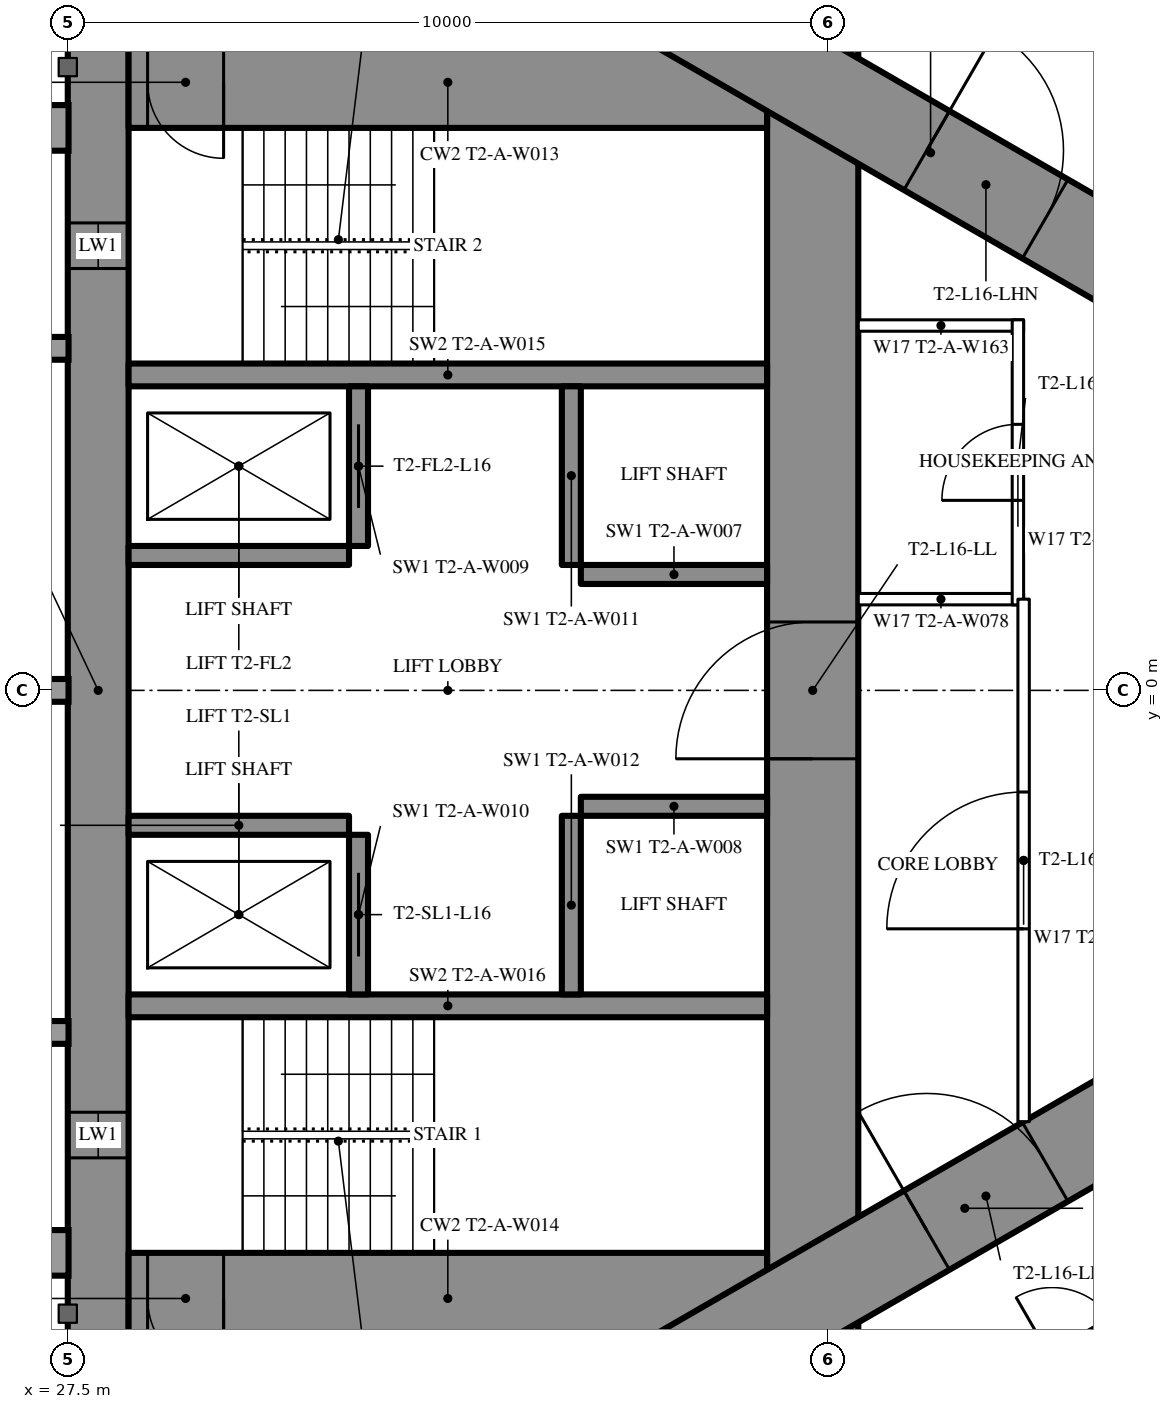
"""IFC4 building model, lengths in metres.
Left out: names, types, materials, properties, quantities, classifications, styles, units other than length and angle.
Written with IfcOpenShell. Run it as: python <this file> out.ifc"""

import sys

from ifc_helpers import new_model, si_unit, direction, frame, frame_2d, origin, place, context, subcontext, project, spatial, rectangle, extrude, element, fill, save


model = new_model("IFC4")
c1 = context("Model", 3, precision=1e-05, world=origin(), true_north=direction((0.0, 1.0)))
c2 = subcontext(c1, "Body", "Model", "MODEL_VIEW")
j1 = project(units=[si_unit("LENGTHUNIT", "METRE"), si_unit("PLANEANGLEUNIT", "RADIAN")], contexts=[c1])
p1 = place(None, origin())
s1 = spatial("IfcSite", under=j1, at=p1, CompositionType="ELEMENT")
p2 = place(p1, origin())
s2 = spatial("IfcBuilding", under=s1, at=p2, CompositionType="ELEMENT")
p3 = place(p2, frame((0.0, 0.0, 63.5)))
s3 = spatial("IfcBuildingStorey", under=s2, at=p3, CompositionType="ELEMENT", Elevation=63.5)
p4 = place(p3, frame((27.9, -8.6, 0.0), z_axis=(0.0, 0.0, 1.0), x_axis=(0.0, 1.0, 0.0)))
e1 = element("IfcWall", 1, at=p4, inside=s3, PredefinedType="SHEAR", context=c2, shape_type="SweptSolid", body=[
    extrude(rectangle(XDim=17.2, YDim=0.8, at=frame_2d((8.6, 0.0))), origin(), (0.0, 0.0, 1.0), 3.5),
])
p5 = place(p4, frame((2.45, 0.0, 0.6)))
e2 = element("IfcOpeningElement", 2, at=p5, cuts=e1, PredefinedType="OPENING", context=c2, shape_type="SweptSolid", body=[
    extrude(rectangle(XDim=0.6, YDim=2.1, at=frame_2d((0.3, 1.05))), frame((0.0, 0.41, 0.0), z_axis=(0.0, -1.0, 0.0), x_axis=(1.0, 0.0, 0.0)), (0.0, 0.0, 1.0), 0.82),
])
p6 = place(p4, frame((14.15, 0.0, 0.6)))
e3 = element("IfcOpeningElement", 3, at=p6, cuts=e1, PredefinedType="OPENING", context=c2, shape_type="SweptSolid", body=[
    extrude(rectangle(XDim=0.6, YDim=2.1, at=frame_2d((0.3, 1.05))), frame((0.0, 0.41, 0.0), z_axis=(0.0, -1.0, 0.0), x_axis=(1.0, 0.0, 0.0)), (0.0, 0.0, 1.0), 0.82),
])
p7 = place(p3, frame((37.3, -8.6, 0.0), z_axis=(0.0, 0.0, 1.0), x_axis=(0.0, 1.0, 0.0)))
e4 = element("IfcWall", 4, at=p7, inside=s3, PredefinedType="SHEAR", context=c2, shape_type="SweptSolid", body=[
    extrude(rectangle(XDim=17.2, YDim=1.2, at=frame_2d((8.6, 0.0))), origin(), (0.0, 0.0, 1.0), 3.5),
])
p8 = place(p7, frame((7.7, 0.0, 0.0)))
e5 = element("IfcOpeningElement", 5, at=p8, cuts=e4, PredefinedType="OPENING", context=c2, shape_type="SweptSolid", body=[
    extrude(rectangle(XDim=1.8, YDim=2.2, at=frame_2d((0.9, 1.1))), frame((0.0, 0.61, 0.0), z_axis=(0.0, -1.0, 0.0), x_axis=(1.0, 0.0, 0.0)), (0.0, 0.0, 1.0), 1.22),
])
p9 = place(p3, frame((28.3, -8.0, 0.0), z_axis=(0.0, 0.0, 1.0), x_axis=(1.0, 0.0, 0.0)))
e6 = element("IfcWall", 6, at=p9, inside=s3, PredefinedType="SHEAR", context=c2, shape_type="SweptSolid", body=[
    extrude(rectangle(XDim=8.4, YDim=1.2, at=frame_2d((4.2, 0.0))), origin(), (0.0, 0.0, 1.0), 3.5),
])
p10 = place(p9, frame((0.25, 0.0, 0.0)))
e7 = element("IfcOpeningElement", 7, at=p10, cuts=e6, PredefinedType="OPENING", context=c2, shape_type="SweptSolid", body=[
    extrude(rectangle(XDim=1.0, YDim=2.2, at=frame_2d((0.5, 1.1))), frame((0.0, 0.61, 0.0), z_axis=(0.0, -1.0, 0.0), x_axis=(1.0, 0.0, 0.0)), (0.0, 0.0, 1.0), 1.22),
])
p11 = place(p3, frame((28.3, 8.0, 0.0), z_axis=(0.0, 0.0, 1.0), x_axis=(1.0, 0.0, 0.0)))
e8 = element("IfcWall", 8, at=p11, inside=s3, PredefinedType="SHEAR", context=c2, shape_type="SweptSolid", body=[
    extrude(rectangle(XDim=8.4, YDim=1.2, at=frame_2d((4.2, 0.0))), origin(), (0.0, 0.0, 1.0), 3.5),
])
p12 = place(p11, frame((0.25, 0.0, 0.0)))
e9 = element("IfcOpeningElement", 9, at=p12, cuts=e8, PredefinedType="OPENING", context=c2, shape_type="SweptSolid", body=[
    extrude(rectangle(XDim=1.0, YDim=2.2, at=frame_2d((0.5, 1.1))), frame((0.0, 0.61, 0.0), z_axis=(0.0, -1.0, 0.0), x_axis=(1.0, 0.0, 0.0)), (0.0, 0.0, 1.0), 1.22),
])
for number, where, z_axis, x_axis in (
    (10, (28.3, -4.15, 0.0), (0.0, 0.0, 1.0), (1.0, 0.0, 0.0)),
    (11, (28.3, 4.15, 0.0), (0.0, 0.0, 1.0), (1.0, 0.0, 0.0)),
):
    element("IfcWall", number, at=place(p3, frame(where, z_axis=z_axis, x_axis=x_axis)), inside=s3, PredefinedType="SHEAR", context=c2, shape_type="SweptSolid", body=[
        extrude(rectangle(XDim=8.4, YDim=0.3, at=frame_2d((4.2, 0.0))), origin(), (0.0, 0.0, 1.0), 3.5),
    ])
p13 = place(p3, frame((31.325, -4.0, 0.0), z_axis=(0.0, 0.0, 1.0), x_axis=(0.0, 1.0, 0.0)))
e12 = element("IfcWall", 12, at=p13, inside=s3, PredefinedType="SHEAR", context=c2, shape_type="SweptSolid", body=[
    extrude(rectangle(XDim=2.1, YDim=0.25, at=frame_2d((1.05, 0.0))), origin(), (0.0, 0.0, 1.0), 3.5),
])
p14 = place(p13, frame((0.5, 0.0, 0.0)))
e13 = element("IfcOpeningElement", 13, at=p14, cuts=e12, PredefinedType="OPENING", context=c2, shape_type="SweptSolid", body=[
    extrude(rectangle(XDim=1.1, YDim=2.2, at=frame_2d((0.55, 1.1))), frame((0.0, 0.135, 0.0), z_axis=(0.0, -1.0, 0.0), x_axis=(1.0, 0.0, 0.0)), (0.0, 0.0, 1.0), 0.27),
])
p15 = place(p3, frame((34.125, -4.0, 0.0), z_axis=(0.0, 0.0, 1.0), x_axis=(0.0, 1.0, 0.0)))
e14 = element("IfcWall", 14, at=p15, inside=s3, PredefinedType="SHEAR", context=c2, shape_type="SweptSolid", body=[
    extrude(rectangle(XDim=2.35, YDim=0.25, at=frame_2d((1.175, 0.0))), origin(), (0.0, 0.0, 1.0), 3.5),
])
p16 = place(p3, frame((28.3, -1.775, 0.0), z_axis=(0.0, 0.0, 1.0), x_axis=(1.0, 0.0, 0.0)))
e15 = element("IfcWall", 15, at=p16, inside=s3, PredefinedType="SHEAR", context=c2, shape_type="SweptSolid", body=[
    extrude(rectangle(XDim=2.9, YDim=0.25, at=frame_2d((1.45, 0.0))), origin(), (0.0, 0.0, 1.0), 3.5),
])
p17 = place(p3, frame((34.25, -1.525, 0.0), z_axis=(0.0, 0.0, 1.0), x_axis=(1.0, 0.0, 0.0)))
e16 = element("IfcWall", 16, at=p17, inside=s3, PredefinedType="SHEAR", context=c2, shape_type="SweptSolid", body=[
    extrude(rectangle(XDim=2.45, YDim=0.25, at=frame_2d((1.225, 0.0))), origin(), (0.0, 0.0, 1.0), 3.5),
])
p18 = place(p3, frame((31.325, 1.9, 0.0), z_axis=(0.0, 0.0, 1.0), x_axis=(0.0, 1.0, 0.0)))
e17 = element("IfcWall", 17, at=p18, inside=s3, PredefinedType="SHEAR", context=c2, shape_type="SweptSolid", body=[
    extrude(rectangle(XDim=2.1, YDim=0.25, at=frame_2d((1.05, 0.0))), origin(), (0.0, 0.0, 1.0), 3.5),
])
p19 = place(p18, frame((0.5, 0.0, 0.0)))
e18 = element("IfcOpeningElement", 18, at=p19, cuts=e17, PredefinedType="OPENING", context=c2, shape_type="SweptSolid", body=[
    extrude(rectangle(XDim=1.1, YDim=2.2, at=frame_2d((0.55, 1.1))), frame((0.0, 0.135, 0.0), z_axis=(0.0, -1.0, 0.0), x_axis=(1.0, 0.0, 0.0)), (0.0, 0.0, 1.0), 0.27),
])
p20 = place(p3, frame((34.125, 1.65, 0.0), z_axis=(0.0, 0.0, 1.0), x_axis=(0.0, 1.0, 0.0)))
e19 = element("IfcWall", 19, at=p20, inside=s3, PredefinedType="SHEAR", context=c2, shape_type="SweptSolid", body=[
    extrude(rectangle(XDim=2.35, YDim=0.25, at=frame_2d((1.175, 0.0))), origin(), (0.0, 0.0, 1.0), 3.5),
])
p21 = place(p3, frame((28.3, 1.775, 0.0), z_axis=(0.0, 0.0, 1.0), x_axis=(1.0, 0.0, 0.0)))
e20 = element("IfcWall", 20, at=p21, inside=s3, PredefinedType="SHEAR", context=c2, shape_type="SweptSolid", body=[
    extrude(rectangle(XDim=2.9, YDim=0.25, at=frame_2d((1.45, 0.0))), origin(), (0.0, 0.0, 1.0), 3.5),
])
p22 = place(p3, frame((34.25, 1.525, 0.0), z_axis=(0.0, 0.0, 1.0), x_axis=(1.0, 0.0, 0.0)))
e21 = element("IfcWall", 21, at=p22, inside=s3, PredefinedType="SHEAR", context=c2, shape_type="SweptSolid", body=[
    extrude(rectangle(XDim=2.45, YDim=0.25, at=frame_2d((1.225, 0.0))), origin(), (0.0, 0.0, 1.0), 3.5),
])
p23 = place(p3, frame((27.2, -13.8, 0.0), z_axis=(0.0, 0.0, 1.0), x_axis=(0.866027159892, 0.499996958321, 0.0)))
e22 = element("IfcWall", 22, at=p23, inside=s3, PredefinedType="SHEAR", context=c2, shape_type="SweptSolid", body=[
    extrude(rectangle(XDim=27.947, YDim=1.2, at=frame_2d((13.973, 0.0))), origin(), (0.0, 0.0, 1.0), 3.5),
])
p24 = place(p23, frame((4.6, 0.0, 0.0)))
e23 = element("IfcOpeningElement", 23, at=p24, cuts=e22, PredefinedType="OPENING", context=c2, shape_type="SweptSolid", body=[
    extrude(rectangle(XDim=1.0, YDim=2.2, at=frame_2d((0.5, 1.1))), frame((0.0, 0.61, 0.0), z_axis=(0.0, -1.0, 0.0), x_axis=(1.0, 0.0, 0.0)), (0.0, 0.0, 1.0), 1.22),
])
p25 = place(p23, frame((13.395, 0.0, 0.0)))
e24 = element("IfcOpeningElement", 24, at=p25, cuts=e22, PredefinedType="OPENING", context=c2, shape_type="SweptSolid", body=[
    extrude(rectangle(XDim=1.8, YDim=2.2, at=frame_2d((0.9, 1.1))), frame((0.0, 0.61, 0.0), z_axis=(0.0, -1.0, 0.0), x_axis=(1.0, 0.0, 0.0)), (0.0, 0.0, 1.0), 1.22),
])
p26 = place(p3, frame((27.2, 13.8, 0.0), z_axis=(0.0, 0.0, 1.0), x_axis=(0.866024515034, -0.500001539357, 0.0)))
e25 = element("IfcWall", 25, at=p26, inside=s3, PredefinedType="SHEAR", context=c2, shape_type="SweptSolid", body=[
    extrude(rectangle(XDim=26.907, YDim=1.2, at=frame_2d((13.454, 0.0))), origin(), (0.0, 0.0, 1.0), 3.5),
])
p27 = place(p26, frame((4.6, 0.0, 0.0)))
e26 = element("IfcOpeningElement", 26, at=p27, cuts=e25, PredefinedType="OPENING", context=c2, shape_type="SweptSolid", body=[
    extrude(rectangle(XDim=1.0, YDim=2.2, at=frame_2d((0.5, 1.1))), frame((0.0, 0.61, 0.0), z_axis=(0.0, -1.0, 0.0), x_axis=(1.0, 0.0, 0.0)), (0.0, 0.0, 1.0), 1.22),
])
p28 = place(p26, frame((13.395, 0.0, 0.0)))
e27 = element("IfcOpeningElement", 27, at=p28, cuts=e25, PredefinedType="OPENING", context=c2, shape_type="SweptSolid", body=[
    extrude(rectangle(XDim=1.8, YDim=2.2, at=frame_2d((0.9, 1.1))), frame((0.0, 0.61, 0.0), z_axis=(0.0, -1.0, 0.0), x_axis=(1.0, 0.0, 0.0)), (0.0, 0.0, 1.0), 1.22),
])
p29 = place(p3, frame((37.96, -10.243, 0.0), z_axis=(0.0, 0.0, 1.0), x_axis=(0.866026429433, 0.499998223521, 0.0)))
e28 = element("IfcWall", 28, at=p29, inside=s3, PredefinedType="PARTITIONING", context=c2, shape_type="SweptSolid", body=[
    extrude(rectangle(XDim=20.487, YDim=0.2, at=frame_2d((10.243, 0.0))), origin(), (0.0, 0.0, 1.0), 3.25),
])
p30 = place(p29, frame((6.925, 0.0, 0.0)))
e29 = element("IfcOpeningElement", 29, at=p30, cuts=e28, PredefinedType="OPENING", context=c2, shape_type="SweptSolid", body=[
    extrude(rectangle(XDim=0.95, YDim=2.2, at=frame_2d((0.475, 1.1))), frame((0.0, 0.11, 0.0), z_axis=(0.0, -1.0, 0.0), x_axis=(1.0, 0.0, 0.0)), (0.0, 0.0, 1.0), 0.22),
])
p31 = place(p29, frame((8.912, 0.0, 0.0)))
e30 = element("IfcOpeningElement", 30, at=p31, cuts=e28, PredefinedType="OPENING", context=c2, shape_type="SweptSolid", body=[
    extrude(rectangle(XDim=0.95, YDim=2.2, at=frame_2d((0.475, 1.1))), frame((0.0, 0.11, 0.0), z_axis=(0.0, -1.0, 0.0), x_axis=(1.0, 0.0, 0.0)), (0.0, 0.0, 1.0), 0.22),
])
p32 = place(p29, frame((13.535, 0.0, 0.0)))
e31 = element("IfcOpeningElement", 31, at=p32, cuts=e28, PredefinedType="OPENING", context=c2, shape_type="SweptSolid", body=[
    extrude(rectangle(XDim=0.95, YDim=2.2, at=frame_2d((0.475, 1.1))), frame((0.0, 0.11, 0.0), z_axis=(0.0, -1.0, 0.0), x_axis=(1.0, 0.0, 0.0)), (0.0, 0.0, 1.0), 0.22),
])
p33 = place(p29, frame((17.585, 0.0, 0.0)))
e32 = element("IfcOpeningElement", 32, at=p33, cuts=e28, PredefinedType="OPENING", context=c2, shape_type="SweptSolid", body=[
    extrude(rectangle(XDim=0.95, YDim=2.2, at=frame_2d((0.475, 1.1))), frame((0.0, 0.11, 0.0), z_axis=(0.0, -1.0, 0.0), x_axis=(1.0, 0.0, 0.0)), (0.0, 0.0, 1.0), 0.22),
])
p34 = place(p29, frame((2.875, 0.0, 0.0)))
e33 = element("IfcOpeningElement", 33, at=p34, cuts=e28, PredefinedType="OPENING", context=c2, shape_type="SweptSolid", body=[
    extrude(rectangle(XDim=0.95, YDim=2.2, at=frame_2d((0.475, 1.1))), frame((0.0, 0.11, 0.0), z_axis=(0.0, -1.0, 0.0), x_axis=(1.0, 0.0, 0.0)), (0.0, 0.0, 1.0), 0.22),
])
for number, where, z_axis, x_axis in (
    (34, (37.9, 1.2, 0.0), (0.0, 0.0, 1.0), (1.0, 0.0, 0.0)),
    (35, (37.9, 4.8, 0.0), (0.0, 0.0, 1.0), (1.0, 0.0, 0.0)),
):
    element("IfcWall", number, at=place(p3, frame(where, z_axis=z_axis, x_axis=x_axis)), inside=s3, PredefinedType="PARTITIONING", context=c2, shape_type="SweptSolid", body=[
        extrude(rectangle(XDim=2.175, YDim=0.15, at=frame_2d((1.087, 0.0))), origin(), (0.0, 0.0, 1.0), 3.25),
    ])
p35 = place(p3, frame((40.0, 1.125, 0.0), z_axis=(0.0, 0.0, 1.0), x_axis=(0.0, 1.0, 0.0)))
e36 = element("IfcWall", 36, at=p35, inside=s3, PredefinedType="PARTITIONING", context=c2, shape_type="SweptSolid", body=[
    extrude(rectangle(XDim=3.75, YDim=0.15, at=frame_2d((1.875, 0.0))), origin(), (0.0, 0.0, 1.0), 3.25),
])
p36 = place(p35, frame((1.375, 0.0, 0.0)))
e37 = element("IfcOpeningElement", 37, at=p36, cuts=e36, PredefinedType="OPENING", context=c2, shape_type="SweptSolid", body=[
    extrude(rectangle(XDim=1.0, YDim=2.2, at=frame_2d((0.5, 1.1))), frame((0.0, 0.085, 0.0), z_axis=(0.0, -1.0, 0.0), x_axis=(1.0, 0.0, 0.0)), (0.0, 0.0, 1.0), 0.17),
])
p37 = place(p3, frame((40.075, -5.674, 0.0), z_axis=(0.0, 0.0, 1.0), x_axis=(0.0, 1.0, 0.0)))
e38 = element("IfcWall", 38, at=p37, inside=s3, PredefinedType="PARTITIONING", context=c2, shape_type="SweptSolid", body=[
    extrude(rectangle(XDim=6.874, YDim=0.15, at=frame_2d((3.437, 0.0))), origin(), (0.0, 0.0, 1.0), 3.25),
])
p38 = place(p37, frame((2.537, 0.0, 0.0)))
e39 = element("IfcOpeningElement", 39, at=p38, cuts=e38, PredefinedType="OPENING", context=c2, shape_type="SweptSolid", body=[
    extrude(rectangle(XDim=1.8, YDim=2.2, at=frame_2d((0.9, 1.1))), frame((0.0, 0.085, 0.0), z_axis=(0.0, -1.0, 0.0), x_axis=(1.0, 0.0, 0.0)), (0.0, 0.0, 1.0), 0.17),
])
p39 = place(p34, origin())
e40 = element("IfcDoor", 40, at=p39, inside=s3, OperationType="SINGLE_SWING_LEFT", PredefinedType="DOOR", context=c2, shape_type="SweptSolid", body=[
    extrude(rectangle(XDim=0.95, YDim=2.2, at=frame_2d((0.475, 1.1))), frame((0.0, 0.025, 0.0), z_axis=(0.0, -1.0, 0.0), x_axis=(1.0, 0.0, 0.0)), (0.0, 0.0, 1.0), 0.05),
])
fill(e33, e40)
p40 = place(p36, origin())
e41 = element("IfcDoor", 41, at=p40, inside=s3, OperationType="SINGLE_SWING_LEFT", PredefinedType="DOOR", context=c2, shape_type="SweptSolid", body=[
    extrude(rectangle(XDim=1.0, YDim=2.2, at=frame_2d((0.5, 1.1))), frame((0.0, 0.025, 0.0), z_axis=(0.0, -1.0, 0.0), x_axis=(1.0, 0.0, 0.0)), (0.0, 0.0, 1.0), 0.05),
])
fill(e37, e41)
p41 = place(p38, origin())
e42 = element("IfcDoor", 42, at=p41, inside=s3, OperationType="DOUBLE_DOOR_SINGLE_SWING", PredefinedType="DOOR", context=c2, shape_type="SweptSolid", body=[
    extrude(rectangle(XDim=1.8, YDim=2.2, at=frame_2d((0.9, 1.1))), frame((0.0, 0.025, 0.0), z_axis=(0.0, -1.0, 0.0), x_axis=(1.0, 0.0, 0.0)), (0.0, 0.0, 1.0), 0.05),
])
fill(e39, e42)
p42 = place(p25, origin())
e43 = element("IfcDoor", 43, at=p42, inside=s3, OperationType="DOUBLE_DOOR_SINGLE_SWING", PredefinedType="DOOR", context=c2, shape_type="SweptSolid", body=[
    extrude(rectangle(XDim=1.8, YDim=2.2, at=frame_2d((0.9, 1.1))), frame((0.0, 0.025, 0.0), z_axis=(0.0, -1.0, 0.0), x_axis=(1.0, 0.0, 0.0)), (0.0, 0.0, 1.0), 0.05),
])
fill(e24, e43)
p43 = place(p28, origin())
e44 = element("IfcDoor", 44, at=p43, inside=s3, OperationType="DOUBLE_DOOR_SINGLE_SWING", PredefinedType="DOOR", context=c2, shape_type="SweptSolid", body=[
    extrude(rectangle(XDim=1.8, YDim=2.2, at=frame_2d((0.9, 1.1))), frame((0.0, 0.025, 0.0), z_axis=(0.0, -1.0, 0.0), x_axis=(1.0, 0.0, 0.0)), (0.0, 0.0, 1.0), 0.05),
])
fill(e27, e44)
p44 = place(p8, origin())
e45 = element("IfcDoor", 45, at=p44, inside=s3, OperationType="DOUBLE_DOOR_SINGLE_SWING", PredefinedType="DOOR", context=c2, shape_type="SweptSolid", body=[
    extrude(rectangle(XDim=1.8, YDim=2.2, at=frame_2d((0.9, 1.1))), frame((0.0, 0.025, 0.0), z_axis=(0.0, -1.0, 0.0), x_axis=(1.0, 0.0, 0.0)), (0.0, 0.0, 1.0), 0.05),
])
fill(e5, e45)
p45 = place(p10, origin())
e46 = element("IfcDoor", 46, at=p45, inside=s3, OperationType="SINGLE_SWING_RIGHT", PredefinedType="DOOR", context=c2, shape_type="SweptSolid", body=[
    extrude(rectangle(XDim=1.0, YDim=2.2, at=frame_2d((0.5, 1.1))), frame((0.0, 0.025, 0.0), z_axis=(0.0, -1.0, 0.0), x_axis=(1.0, 0.0, 0.0)), (0.0, 0.0, 1.0), 0.05),
])
fill(e7, e46)
p46 = place(p12, origin())
e47 = element("IfcDoor", 47, at=p46, inside=s3, OperationType="SINGLE_SWING_RIGHT", PredefinedType="DOOR", context=c2, shape_type="SweptSolid", body=[
    extrude(rectangle(XDim=1.0, YDim=2.2, at=frame_2d((0.5, 1.1))), frame((0.0, 0.025, 0.0), z_axis=(0.0, -1.0, 0.0), x_axis=(1.0, 0.0, 0.0)), (0.0, 0.0, 1.0), 0.05),
])
fill(e9, e47)
p47 = place(p14, origin())
e48 = element("IfcDoor", 48, at=p47, inside=s3, OperationType="SLIDING_TO_LEFT", PredefinedType="USERDEFINED", context=c2, shape_type="SweptSolid", body=[
    extrude(rectangle(XDim=1.1, YDim=2.2, at=frame_2d((0.55, 1.1))), frame((0.0, 0.025, 0.0), z_axis=(0.0, -1.0, 0.0), x_axis=(1.0, 0.0, 0.0)), (0.0, 0.0, 1.0), 0.05),
])
fill(e13, e48)
p48 = place(p19, origin())
e49 = element("IfcDoor", 49, at=p48, inside=s3, OperationType="SLIDING_TO_LEFT", PredefinedType="USERDEFINED", context=c2, shape_type="SweptSolid", body=[
    extrude(rectangle(XDim=1.1, YDim=2.2, at=frame_2d((0.55, 1.1))), frame((0.0, 0.025, 0.0), z_axis=(0.0, -1.0, 0.0), x_axis=(1.0, 0.0, 0.0)), (0.0, 0.0, 1.0), 0.05),
])
fill(e18, e49)
p49 = place(p5, origin())
e50 = element("IfcWindow", 50, at=p49, inside=s3, PartitioningType="SINGLE_PANEL", PredefinedType="WINDOW", context=c2, shape_type="SweptSolid", body=[
    extrude(rectangle(XDim=0.6, YDim=2.1, at=frame_2d((0.3, 1.05))), frame((0.0, 0.03, 0.0), z_axis=(0.0, -1.0, 0.0), x_axis=(1.0, 0.0, 0.0)), (0.0, 0.0, 1.0), 0.06),
])
fill(e2, e50)
p50 = place(p6, origin())
e51 = element("IfcWindow", 51, at=p50, inside=s3, PartitioningType="SINGLE_PANEL", PredefinedType="WINDOW", context=c2, shape_type="SweptSolid", body=[
    extrude(rectangle(XDim=0.6, YDim=2.1, at=frame_2d((0.3, 1.05))), frame((0.0, 0.03, 0.0), z_axis=(0.0, -1.0, 0.0), x_axis=(1.0, 0.0, 0.0)), (0.0, 0.0, 1.0), 0.06),
])
fill(e3, e51)
save(model, sys.argv[1])
